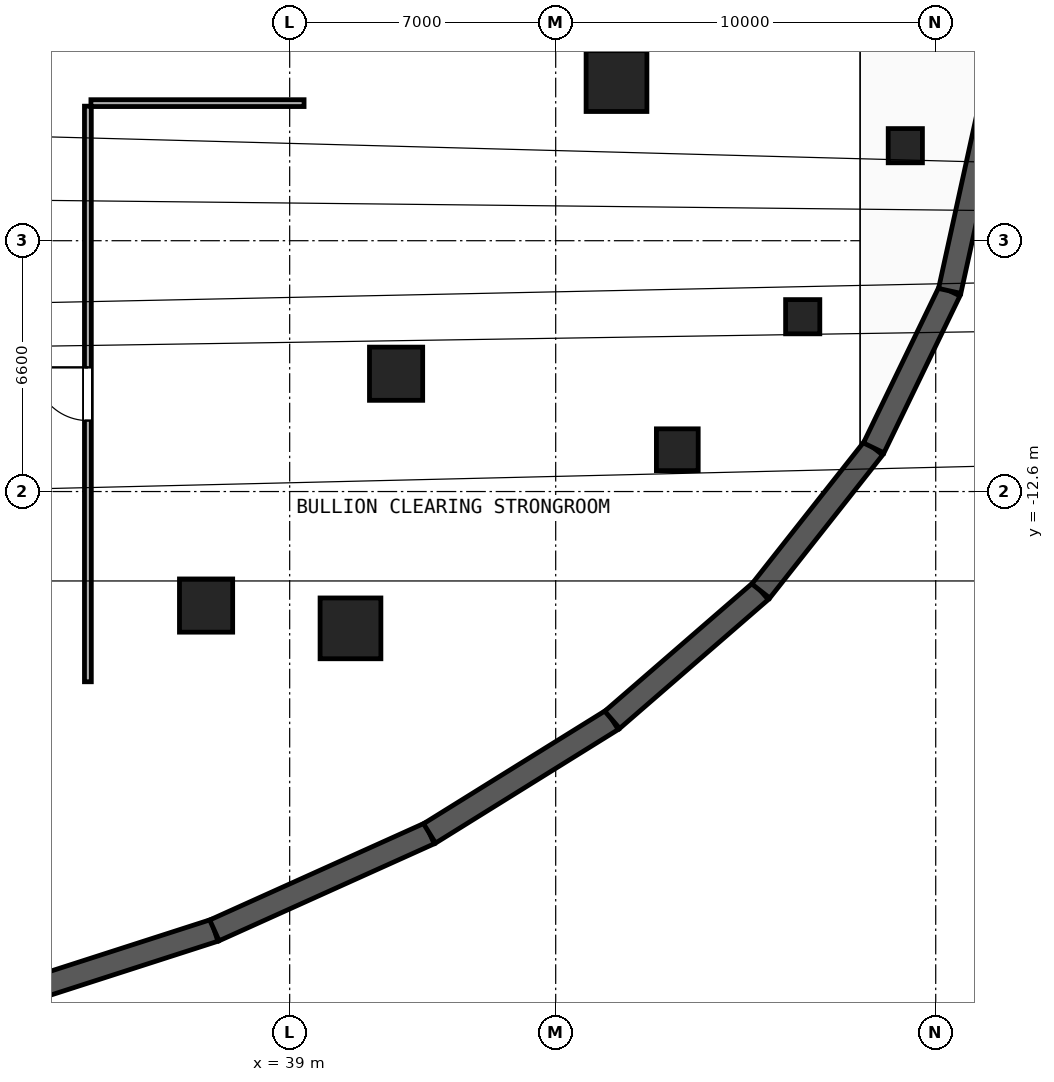
"""IFC4 building model, lengths in metres.
Left out: names, types, materials, properties, quantities, classifications, styles, units other than length and angle.
Written with IfcOpenShell. Run it as: python <this file> out.ifc"""

import sys

from ifc_helpers import new_model, si_unit, direction, frame, frame_2d, origin, origin_2d, place, context, subcontext, project, spatial, rectangle, circle, extrude, element, fill, save


model = new_model("IFC4")
c1 = context("Model", 3, precision=1e-05, world=origin(), true_north=direction((0.0, 1.0)))
c2 = subcontext(c1, "Body", "Model", "MODEL_VIEW")
j1 = project(units=[si_unit("LENGTHUNIT", "METRE"), si_unit("PLANEANGLEUNIT", "RADIAN")], contexts=[c1])
p1 = place(None, origin())
s1 = spatial("IfcSite", under=j1, at=p1, CompositionType="ELEMENT")
p2 = place(p1, origin())
s2 = spatial("IfcBuilding", under=s1, at=p2, CompositionType="ELEMENT")
p3 = place(p2, frame((0.0, 0.0, -9.0)))
s3 = spatial("IfcBuildingStorey", under=s2, at=p3, CompositionType="ELEMENT", Elevation=-9.0)
for number, where, z_axis, x_axis in (
    (1, (41.8, -9.5, 0.0), (0.0, 0.0, 1.0), (1.0, 0.0, 0.0)),
    (2, (36.8, -15.6, 0.0), (0.0, 0.0, 1.0), (1.0, 0.0, 0.0)),
):
    element("IfcColumn", number, at=place(p3, frame(where, z_axis=z_axis, x_axis=x_axis)), inside=s3, PredefinedType="COLUMN", context=c2, shape_type="SweptSolid", body=[
        extrude(rectangle(XDim=1.4, YDim=1.4, at=origin_2d()), origin(), (0.0, 0.0, 1.0), 4.5),
    ])
for number, where, z_axis, x_axis in (
    (3, (40.6, -16.2, 0.0), (0.0, 0.0, 1.0), (1.0, 0.0, 0.0)),
    (4, (47.6, -1.8, 0.0), (0.0, 0.0, 1.0), (1.0, 0.0, 0.0)),
):
    element("IfcColumn", number, at=place(p3, frame(where, z_axis=z_axis, x_axis=x_axis)), inside=s3, PredefinedType="COLUMN", context=c2, shape_type="SweptSolid", body=[
        extrude(rectangle(XDim=1.6, YDim=1.6, at=origin_2d()), origin(), (0.0, 0.0, 1.0), 4.5),
    ])
p4 = place(p3, frame((49.2, -11.5, 0.0), z_axis=(0.0, 0.0, 1.0), x_axis=(1.0, 0.0, 0.0)))
e5 = element("IfcColumn", 5, at=p4, inside=s3, PredefinedType="PILASTER", context=c2, shape_type="SweptSolid", body=[
    extrude(circle(Radius=0.55, at=origin_2d()), origin(), (0.0, 0.0, 1.0), 4.5),
])
for number, where, z_axis, x_axis in (
    (6, (52.5, -8.0, 0.0), (0.0, 0.0, 1.0), (1.0, 0.0, 0.0)),
    (7, (55.2, -3.5, 0.0), (0.0, 0.0, 1.0), (1.0, 0.0, 0.0)),
):
    element("IfcColumn", number, at=place(p3, frame(where, z_axis=z_axis, x_axis=x_axis)), inside=s3, PredefinedType="COLUMN", context=c2, shape_type="SweptSolid", body=[
        extrude(rectangle(XDim=0.9, YDim=0.9, at=origin_2d()), origin(), (0.0, 0.0, 1.0), 4.5),
    ])
p5 = place(p3, frame((30.546, -26.232, 0.0), z_axis=(0.0, 0.0, 1.0), x_axis=(0.951843868052, 0.306583187492, 0.0)))
e8 = element("IfcWall", 8, at=p5, inside=s3, PredefinedType="USERDEFINED", context=c2, shape_type="SweptSolid", body=[
    extrude(rectangle(XDim=6.801, YDim=0.6, at=frame_2d((3.4, 0.0))), origin(), (0.0, 0.0, 1.0), 4.15),
])
p6 = place(p3, frame((37.019, -24.147, 0.0), z_axis=(0.0, 0.0, 1.0), x_axis=(0.911643952457, 0.410980904603, 0.0)))
e9 = element("IfcWall", 9, at=p6, inside=s3, PredefinedType="USERDEFINED", context=c2, shape_type="SweptSolid", body=[
    extrude(rectangle(XDim=6.209, YDim=0.6, at=frame_2d((3.105, 0.0))), origin(), (0.0, 0.0, 1.0), 4.15),
])
p7 = place(p3, frame((42.68, -21.595, 0.0), z_axis=(0.0, 0.0, 1.0), x_axis=(0.849299437699, 0.527911417877, 0.0)))
e10 = element("IfcWall", 10, at=p7, inside=s3, PredefinedType="USERDEFINED", context=c2, shape_type="SweptSolid", body=[
    extrude(rectangle(XDim=5.66, YDim=0.6, at=frame_2d((2.83, 0.0))), origin(), (0.0, 0.0, 1.0), 4.15),
])
p8 = place(p3, frame((47.487, -18.607, 0.0), z_axis=(0.0, 0.0, 1.0), x_axis=(0.755564536906, 0.655074217605, 0.0)))
e11 = element("IfcWall", 11, at=p8, inside=s3, PredefinedType="USERDEFINED", context=c2, shape_type="SweptSolid", body=[
    extrude(rectangle(XDim=5.175, YDim=0.6, at=frame_2d((2.587, 0.0))), origin(), (0.0, 0.0, 1.0), 4.15),
])
p9 = place(p3, frame((51.397, -15.217, 0.0), z_axis=(0.0, 0.0, 1.0), x_axis=(0.619447864054, 0.785037797637, 0.0)))
e12 = element("IfcWall", 12, at=p9, inside=s3, PredefinedType="USERDEFINED", context=c2, shape_type="SweptSolid", body=[
    extrude(rectangle(XDim=4.796, YDim=0.6, at=frame_2d((2.398, 0.0))), origin(), (0.0, 0.0, 1.0), 4.15),
])
p10 = place(p3, frame((54.368, -11.452, 0.0), z_axis=(0.0, 0.0, 1.0), x_axis=(0.435772260249, 0.900056963307, 0.0)))
e13 = element("IfcWall", 13, at=p10, inside=s3, PredefinedType="USERDEFINED", context=c2, shape_type="SweptSolid", body=[
    extrude(rectangle(XDim=4.59, YDim=0.6, at=frame_2d((2.295, 0.0))), origin(), (0.0, 0.0, 1.0), 4.15),
])
p11 = place(p3, frame((56.368, -7.321, 0.0), z_axis=(0.0, 0.0, 1.0), x_axis=(0.214510247434, 0.976721738135, 0.0)))
e14 = element("IfcWall", 14, at=p11, inside=s3, PredefinedType="USERDEFINED", context=c2, shape_type="SweptSolid", body=[
    extrude(rectangle(XDim=4.69, YDim=0.6, at=frame_2d((2.345, 0.0))), origin(), (0.0, 0.0, 1.0), 4.15),
])
p12 = place(p3, frame((33.69, -17.605, 0.0), z_axis=(0.0, 0.0, 1.0), x_axis=(0.0, 1.0, 0.0)))
e15 = element("IfcWall", 15, at=p12, inside=s3, PredefinedType="PARTITIONING", context=c2, shape_type="SweptSolid", body=[
    extrude(rectangle(XDim=15.145, YDim=0.18, at=frame_2d((7.573, 0.0))), origin(), (0.0, 0.0, 1.0), 4.15),
])
p13 = place(p12, frame((6.873, 0.0, 0.0)))
e16 = element("IfcOpeningElement", 16, at=p13, cuts=e15, PredefinedType="OPENING", context=c2, shape_type="SweptSolid", body=[
    extrude(rectangle(XDim=1.4, YDim=2.2, at=frame_2d((0.7, 1.1))), frame((0.0, 0.1, 0.0), z_axis=(0.0, -1.0, 0.0), x_axis=(1.0, 0.0, 0.0)), (0.0, 0.0, 1.0), 0.2),
])
p14 = place(p3, frame((33.77, -2.38, 0.0), z_axis=(0.0, 0.0, 1.0), x_axis=(1.0, 0.0, 0.0)))
e17 = element("IfcWall", 17, at=p14, inside=s3, PredefinedType="PARTITIONING", context=c2, shape_type="SweptSolid", body=[
    extrude(rectangle(XDim=5.608, YDim=0.18, at=frame_2d((2.804, 0.0))), origin(), (0.0, 0.0, 1.0), 4.15),
])
p15 = place(p13, origin())
e18 = element("IfcDoor", 18, at=p15, inside=s3, OperationType="SINGLE_SWING_RIGHT", PredefinedType="DOOR", context=c2, shape_type="SweptSolid", body=[
    extrude(rectangle(XDim=1.4, YDim=2.2, at=frame_2d((0.7, 1.1))), frame((0.0, 0.025, 0.0), z_axis=(0.0, -1.0, 0.0), x_axis=(1.0, 0.0, 0.0)), (0.0, 0.0, 1.0), 0.05),
])
fill(e16, e18)
save(model, sys.argv[1])
